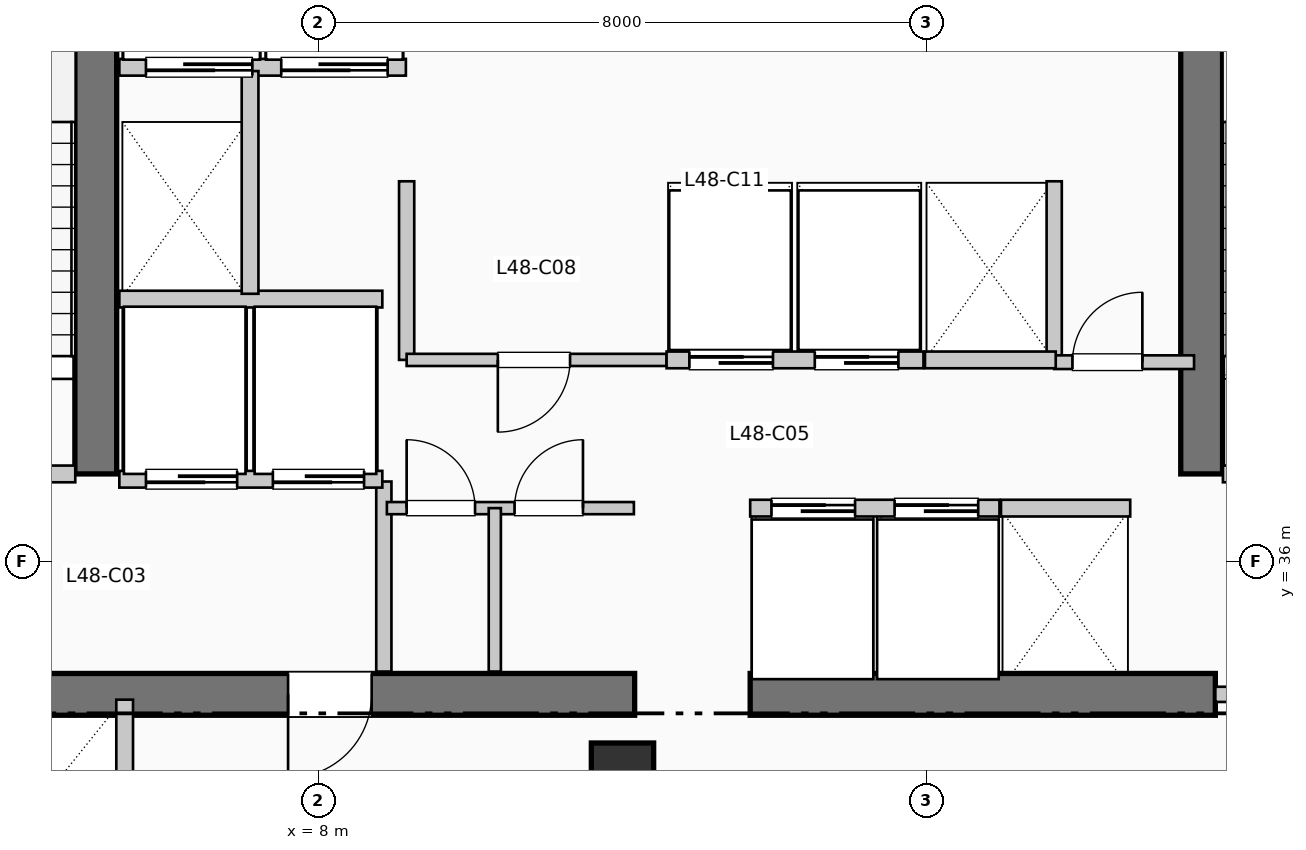
"""IFC4 building model, lengths in metres.
Left out: names, types, materials, properties, quantities, classifications, styles, units other than length and angle.
Written with IfcOpenShell. Run it as: python <this file> out.ifc"""

import sys

from ifc_helpers import new_model, si_unit, direction, frame, frame_2d, origin, origin_2d, place, context, subcontext, project, spatial, rectangle, extrude, element, fill, save


model = new_model("IFC4")
c1 = context("Model", 3, precision=1e-05, world=origin(), true_north=direction((0.0, 1.0)))
c2 = subcontext(c1, "Body", "Model", "MODEL_VIEW")
j1 = project(units=[si_unit("LENGTHUNIT", "METRE"), si_unit("PLANEANGLEUNIT", "RADIAN")], contexts=[c1])
p1 = place(None, origin())
s1 = spatial("IfcSite", under=j1, at=p1, CompositionType="ELEMENT")
p2 = place(p1, origin())
s2 = spatial("IfcBuilding", under=s1, at=p2, CompositionType="ELEMENT")
p3 = place(p2, frame((0.0, 0.0, 199.32)))
s3 = spatial("IfcBuildingStorey", under=s2, at=p3, CompositionType="ELEMENT", Elevation=199.32)
p4 = place(p3, frame((1.45, 34.25, 0.0), z_axis=(0.0, 0.0, 1.0), x_axis=(1.0, 0.0, 0.0)))
e1 = element("IfcWall", 1, at=p4, inside=s3, PredefinedType="SHEAR", context=c2, shape_type="SweptSolid", body=[
    extrude(rectangle(XDim=10.71, YDim=0.55, at=frame_2d((5.355, 0.0))), origin(), (0.0, 0.0, 1.0), 3.96),
])
p5 = place(p4, frame((7.25, 0.0, 0.0), z_axis=(0.0, 0.0, 1.0), x_axis=(-1.0, 0.0, 0.0)))
e2 = element("IfcOpeningElement", 2, at=p5, cuts=e1, PredefinedType="OPENING", context=c2, shape_type="SweptSolid", body=[
    extrude(rectangle(XDim=1.1, YDim=2.15, at=frame_2d((0.55, 1.075))), frame((0.0, 0.285, 0.0), z_axis=(0.0, -1.0, 0.0), x_axis=(1.0, 0.0, 0.0)), (0.0, 0.0, 1.0), 0.57),
])
p6 = place(p3, frame((13.68, 34.25, 0.0), z_axis=(0.0, 0.0, 1.0), x_axis=(1.0, 0.0, 0.0)))
e3 = element("IfcWall", 3, at=p6, inside=s3, PredefinedType="SHEAR", context=c2, shape_type="SweptSolid", body=[
    extrude(rectangle(XDim=6.12, YDim=0.55, at=frame_2d((3.06, 0.0))), origin(), (0.0, 0.0, 1.0), 3.96),
])
for number, where, z_axis, x_axis in (
    (4, (5.07, 37.15, 0.0), (0.0, 0.0, 1.0), (0.0, 1.0, 0.0)),
    (5, (19.62, 37.15, 0.0), (0.0, 0.0, 1.0), (0.0, 1.0, 0.0)),
):
    element("IfcWall", number, at=place(p3, frame(where, z_axis=z_axis, x_axis=x_axis)), inside=s3, PredefinedType="SHEAR", context=c2, shape_type="SweptSolid", body=[
        extrude(rectangle(XDim=7.89, YDim=0.55, at=frame_2d((3.945, 0.0))), origin(), (0.0, 0.0, 1.0), 3.96),
    ])
p7 = place(p3, frame((12.0, 33.2, 0.0), z_axis=(0.0, 0.0, 1.0), x_axis=(1.0, 0.0, 0.0)))
e6 = element("IfcColumn", 6, at=p7, inside=s3, PredefinedType="COLUMN", context=c2, shape_type="SweptSolid", body=[
    extrude(rectangle(XDim=0.82, YDim=0.82, at=origin_2d()), origin(), (0.0, 0.0, 1.0), 3.96),
])
p8 = place(p3, frame((1.65, 37.15, 0.0), z_axis=(0.0, 0.0, 1.0), x_axis=(1.0, 0.0, 0.0)))
e7 = element("IfcWall", 7, at=p8, inside=s3, PredefinedType="PARTITIONING", context=c2, shape_type="SweptSolid", body=[
    extrude(rectangle(XDim=3.15, YDim=0.22, at=frame_2d((1.575, 0.0))), origin(), (0.0, 0.0, 1.0), 3.71),
])
p9 = place(p8, frame((2.05, 0.0, 0.0), z_axis=(0.0, 0.0, 1.0), x_axis=(-1.0, 0.0, 0.0)))
e8 = element("IfcOpeningElement", 8, at=p9, cuts=e7, PredefinedType="OPENING", context=c2, shape_type="SweptSolid", body=[
    extrude(rectangle(XDim=1.05, YDim=2.15, at=frame_2d((0.525, 1.075))), frame((0.0, 0.12, 0.0), z_axis=(0.0, -1.0, 0.0), x_axis=(1.0, 0.0, 0.0)), (0.0, 0.0, 1.0), 0.24),
])
p10 = place(p3, frame((8.86, 34.55, 0.0), z_axis=(0.0, 0.0, 1.0), x_axis=(0.0, 1.0, 0.0)))
e9 = element("IfcWall", 9, at=p10, inside=s3, PredefinedType="PARTITIONING", context=c2, shape_type="SweptSolid", body=[
    extrude(rectangle(XDim=2.5, YDim=0.2, at=frame_2d((1.25, 0.0))), origin(), (0.0, 0.0, 1.0), 3.71),
])
p11 = place(p3, frame((19.9, 37.15, 0.0), z_axis=(0.0, 0.0, 1.0), x_axis=(1.0, 0.0, 0.0)))
e10 = element("IfcWall", 10, at=p11, inside=s3, PredefinedType="PARTITIONING", context=c2, shape_type="SweptSolid", body=[
    extrude(rectangle(XDim=3.15, YDim=0.22, at=frame_2d((1.575, 0.0))), origin(), (0.0, 0.0, 1.0), 3.71),
])
p12 = place(p11, frame((2.05, 0.0, 0.0), z_axis=(0.0, 0.0, 1.0), x_axis=(-1.0, 0.0, 0.0)))
e11 = element("IfcOpeningElement", 11, at=p12, cuts=e10, PredefinedType="OPENING", context=c2, shape_type="SweptSolid", body=[
    extrude(rectangle(XDim=1.05, YDim=2.15, at=frame_2d((0.525, 1.075))), frame((0.0, 0.12, 0.0), z_axis=(0.0, -1.0, 0.0), x_axis=(1.0, 0.0, 0.0)), (0.0, 0.0, 1.0), 0.24),
])
p13 = place(p3, frame((19.8, 34.25, 0.0), z_axis=(0.0, 0.0, 1.0), x_axis=(1.0, 0.0, 0.0)))
e12 = element("IfcWall", 12, at=p13, inside=s3, PredefinedType="PARTITIONING", context=c2, shape_type="SweptSolid", body=[
    extrude(rectangle(XDim=3.25, YDim=0.2, at=frame_2d((1.625, 0.0))), origin(), (0.0, 0.0, 1.0), 3.71),
])
p14 = place(p13, frame((2.15, 0.0, 0.0), z_axis=(0.0, 0.0, 1.0), x_axis=(-1.0, 0.0, 0.0)))
e13 = element("IfcOpeningElement", 13, at=p14, cuts=e12, PredefinedType="OPENING", context=c2, shape_type="SweptSolid", body=[
    extrude(rectangle(XDim=1.1, YDim=2.15, at=frame_2d((0.55, 1.075))), frame((0.0, 0.11, 0.0), z_axis=(0.0, -1.0, 0.0), x_axis=(1.0, 0.0, 0.0)), (0.0, 0.0, 1.0), 0.22),
])
p15 = place(p3, frame((5.38, 37.08, 0.0), z_axis=(0.0, 0.0, 1.0), x_axis=(1.0, 0.0, 0.0)))
e14 = element("IfcWall", 14, at=p15, inside=s3, PredefinedType="PARTITIONING", context=c2, shape_type="SweptSolid", body=[
    extrude(rectangle(XDim=3.46, YDim=0.22, at=frame_2d((1.73, 0.0))), origin(), (0.0, 0.0, 1.0), 3.71),
])
p16 = place(p15, frame((1.55, 0.0, 0.0), z_axis=(0.0, 0.0, 1.0), x_axis=(-1.0, 0.0, 0.0)))
e15 = element("IfcOpeningElement", 15, at=p16, cuts=e14, PredefinedType="OPENING", context=c2, shape_type="SweptSolid", body=[
    extrude(rectangle(XDim=1.2, YDim=2.2, at=frame_2d((0.6, 1.1))), frame((0.0, 0.12, 0.0), z_axis=(0.0, -1.0, 0.0), x_axis=(1.0, 0.0, 0.0)), (0.0, 0.0, 1.0), 0.24),
])
p17 = place(p15, frame((3.22, 0.0, 0.0), z_axis=(0.0, 0.0, 1.0), x_axis=(-1.0, 0.0, 0.0)))
e16 = element("IfcOpeningElement", 16, at=p17, cuts=e14, PredefinedType="OPENING", context=c2, shape_type="SweptSolid", body=[
    extrude(rectangle(XDim=1.2, YDim=2.2, at=frame_2d((0.6, 1.1))), frame((0.0, 0.12, 0.0), z_axis=(0.0, -1.0, 0.0), x_axis=(1.0, 0.0, 0.0)), (0.0, 0.0, 1.0), 0.24),
])
p18 = place(p3, frame((5.38, 39.45, 0.0), z_axis=(0.0, 0.0, 1.0), x_axis=(1.0, 0.0, 0.0)))
e17 = element("IfcWall", 17, at=p18, inside=s3, PredefinedType="PARTITIONING", context=c2, shape_type="SweptSolid", body=[
    extrude(rectangle(XDim=3.46, YDim=0.22, at=frame_2d((1.73, 0.0))), origin(), (0.0, 0.0, 1.0), 3.71),
])
p19 = place(p3, frame((5.38, 42.5, 0.0), z_axis=(0.0, 0.0, 1.0), x_axis=(1.0, 0.0, 0.0)))
e18 = element("IfcWall", 18, at=p19, inside=s3, PredefinedType="PARTITIONING", context=c2, shape_type="SweptSolid", body=[
    extrude(rectangle(XDim=3.77, YDim=0.22, at=frame_2d((1.885, 0.0))), origin(), (0.0, 0.0, 1.0), 3.71),
])
p20 = place(p19, frame((1.75, 0.0, 0.0), z_axis=(0.0, 0.0, 1.0), x_axis=(-1.0, 0.0, 0.0)))
e19 = element("IfcOpeningElement", 19, at=p20, cuts=e18, PredefinedType="OPENING", context=c2, shape_type="SweptSolid", body=[
    extrude(rectangle(XDim=1.4, YDim=2.2, at=frame_2d((0.7, 1.1))), frame((0.0, 0.12, 0.0), z_axis=(0.0, -1.0, 0.0), x_axis=(1.0, 0.0, 0.0)), (0.0, 0.0, 1.0), 0.24),
])
p21 = place(p19, frame((3.53, 0.0, 0.0), z_axis=(0.0, 0.0, 1.0), x_axis=(-1.0, 0.0, 0.0)))
e20 = element("IfcOpeningElement", 20, at=p21, cuts=e18, PredefinedType="OPENING", context=c2, shape_type="SweptSolid", body=[
    extrude(rectangle(XDim=1.4, YDim=2.2, at=frame_2d((0.7, 1.1))), frame((0.0, 0.12, 0.0), z_axis=(0.0, -1.0, 0.0), x_axis=(1.0, 0.0, 0.0)), (0.0, 0.0, 1.0), 0.24),
])
p22 = place(p3, frame((7.1, 39.52, 0.0), z_axis=(0.0, 0.0, 1.0), x_axis=(0.0, 1.0, 0.0)))
e21 = element("IfcWall", 21, at=p22, inside=s3, PredefinedType="PARTITIONING", context=c2, shape_type="SweptSolid", body=[
    extrude(rectangle(XDim=2.93, YDim=0.22, at=frame_2d((1.465, 0.0))), origin(), (0.0, 0.0, 1.0), 3.71),
])
p23 = place(p3, frame((5.45, 31.8, 0.0), z_axis=(0.0, 0.0, 1.0), x_axis=(0.0, 1.0, 0.0)))
e22 = element("IfcWall", 22, at=p23, inside=s3, PredefinedType="PARTITIONING", context=c2, shape_type="SweptSolid", body=[
    extrude(rectangle(XDim=2.38, YDim=0.22, at=frame_2d((1.19, 0.0))), origin(), (0.0, 0.0, 1.0), 3.71),
])
for number, where, z_axis, x_axis in (
    (23, (9.16, 38.65, 0.0), (0.0, 0.0, 1.0), (0.0, 1.0, 0.0)),
    (24, (17.68, 38.65, 0.0), (0.0, 0.0, 1.0), (0.0, 1.0, 0.0)),
):
    element("IfcWall", number, at=place(p3, frame(where, z_axis=z_axis, x_axis=x_axis)), inside=s3, PredefinedType="PARTITIONING", context=c2, shape_type="SweptSolid", body=[
        extrude(rectangle(XDim=2.35, YDim=0.2, at=frame_2d((1.175, 0.0))), origin(), (0.0, 0.0, 1.0), 3.71),
    ])
p24 = place(p3, frame((17.68, 38.62, 0.0), z_axis=(0.0, 0.0, 1.0), x_axis=(1.0, 0.0, 0.0)))
e25 = element("IfcWall", 25, at=p24, inside=s3, PredefinedType="PARTITIONING", context=c2, shape_type="SweptSolid", body=[
    extrude(rectangle(XDim=1.84, YDim=0.18, at=frame_2d((0.92, 0.0))), origin(), (0.0, 0.0, 1.0), 3.71),
])
p25 = place(p24, frame((0.24, 0.0, 0.0)))
e26 = element("IfcOpeningElement", 26, at=p25, cuts=e25, PredefinedType="OPENING", context=c2, shape_type="SweptSolid", body=[
    extrude(rectangle(XDim=0.92, YDim=2.1, at=frame_2d((0.46, 1.05))), frame((0.0, 0.1, 0.0), z_axis=(0.0, -1.0, 0.0), x_axis=(1.0, 0.0, 0.0)), (0.0, 0.0, 1.0), 0.2),
])
p26 = place(p3, frame((8.9, 36.7, 0.0), z_axis=(0.0, 0.0, 1.0), x_axis=(1.0, 0.0, 0.0)))
e27 = element("IfcWall", 27, at=p26, inside=s3, PredefinedType="PARTITIONING", context=c2, shape_type="SweptSolid", body=[
    extrude(rectangle(XDim=3.25, YDim=0.16, at=frame_2d((1.625, 0.0))), origin(), (0.0, 0.0, 1.0), 3.71),
])
p27 = place(p26, frame((0.26, 0.0, 0.0)))
e28 = element("IfcOpeningElement", 28, at=p27, cuts=e27, PredefinedType="OPENING", context=c2, shape_type="SweptSolid", body=[
    extrude(rectangle(XDim=0.9, YDim=2.15, at=frame_2d((0.45, 1.075))), frame((0.0, 0.09, 0.0), z_axis=(0.0, -1.0, 0.0), x_axis=(1.0, 0.0, 0.0)), (0.0, 0.0, 1.0), 0.18),
])
p28 = place(p26, frame((1.68, 0.0, 0.0)))
e29 = element("IfcOpeningElement", 29, at=p28, cuts=e27, PredefinedType="OPENING", context=c2, shape_type="SweptSolid", body=[
    extrude(rectangle(XDim=0.9, YDim=2.15, at=frame_2d((0.45, 1.075))), frame((0.0, 0.09, 0.0), z_axis=(0.0, -1.0, 0.0), x_axis=(1.0, 0.0, 0.0)), (0.0, 0.0, 1.0), 0.18),
])
p29 = place(p3, frame((10.32, 34.55, 0.0), z_axis=(0.0, 0.0, 1.0), x_axis=(0.0, 1.0, 0.0)))
e30 = element("IfcWall", 30, at=p29, inside=s3, PredefinedType="PARTITIONING", context=c2, shape_type="SweptSolid", body=[
    extrude(rectangle(XDim=2.15, YDim=0.16, at=frame_2d((1.075, 0.0))), origin(), (0.0, 0.0, 1.0), 3.71),
])
p30 = place(p3, frame((9.16, 38.65, 0.0), z_axis=(0.0, 0.0, 1.0), x_axis=(1.0, 0.0, 0.0)))
e31 = element("IfcWall", 31, at=p30, inside=s3, PredefinedType="PARTITIONING", context=c2, shape_type="SweptSolid", body=[
    extrude(rectangle(XDim=3.42, YDim=0.16, at=frame_2d((1.71, 0.0))), origin(), (0.0, 0.0, 1.0), 3.71),
])
p31 = place(p30, frame((2.15, 0.0, 0.0), z_axis=(0.0, 0.0, 1.0), x_axis=(-1.0, 0.0, 0.0)))
e32 = element("IfcOpeningElement", 32, at=p31, cuts=e31, PredefinedType="OPENING", context=c2, shape_type="SweptSolid", body=[
    extrude(rectangle(XDim=0.95, YDim=2.15, at=frame_2d((0.475, 1.075))), frame((0.0, 0.09, 0.0), z_axis=(0.0, -1.0, 0.0), x_axis=(1.0, 0.0, 0.0)), (0.0, 0.0, 1.0), 0.18),
])
p32 = place(p3, frame((13.68, 36.7, 0.0), z_axis=(0.0, 0.0, 1.0), x_axis=(1.0, 0.0, 0.0)))
e33 = element("IfcWall", 33, at=p32, inside=s3, PredefinedType="PARTITIONING", context=c2, shape_type="SweptSolid", body=[
    extrude(rectangle(XDim=3.28, YDim=0.22, at=frame_2d((1.64, 0.0))), origin(), (0.0, 0.0, 1.0), 3.71),
])
p33 = place(p32, frame((0.28, 0.0, 0.0)))
e34 = element("IfcOpeningElement", 34, at=p33, cuts=e33, PredefinedType="OPENING", context=c2, shape_type="SweptSolid", body=[
    extrude(rectangle(XDim=1.1, YDim=2.2, at=frame_2d((0.55, 1.1))), frame((0.0, 0.12, 0.0), z_axis=(0.0, -1.0, 0.0), x_axis=(1.0, 0.0, 0.0)), (0.0, 0.0, 1.0), 0.24),
])
p34 = place(p32, frame((1.9, 0.0, 0.0)))
e35 = element("IfcOpeningElement", 35, at=p34, cuts=e33, PredefinedType="OPENING", context=c2, shape_type="SweptSolid", body=[
    extrude(rectangle(XDim=1.1, YDim=2.2, at=frame_2d((0.55, 1.1))), frame((0.0, 0.12, 0.0), z_axis=(0.0, -1.0, 0.0), x_axis=(1.0, 0.0, 0.0)), (0.0, 0.0, 1.0), 0.24),
])
p35 = place(p3, frame((12.58, 38.65, 0.0), z_axis=(0.0, 0.0, 1.0), x_axis=(1.0, 0.0, 0.0)))
e36 = element("IfcWall", 36, at=p35, inside=s3, PredefinedType="PARTITIONING", context=c2, shape_type="SweptSolid", body=[
    extrude(rectangle(XDim=3.38, YDim=0.22, at=frame_2d((1.69, 0.0))), origin(), (0.0, 0.0, 1.0), 3.71),
])
p36 = place(p35, frame((0.3, 0.0, 0.0)))
e37 = element("IfcOpeningElement", 37, at=p36, cuts=e36, PredefinedType="OPENING", context=c2, shape_type="SweptSolid", body=[
    extrude(rectangle(XDim=1.1, YDim=2.2, at=frame_2d((0.55, 1.1))), frame((0.0, 0.12, 0.0), z_axis=(0.0, -1.0, 0.0), x_axis=(1.0, 0.0, 0.0)), (0.0, 0.0, 1.0), 0.24),
])
p37 = place(p35, frame((1.95, 0.0, 0.0)))
e38 = element("IfcOpeningElement", 38, at=p37, cuts=e36, PredefinedType="OPENING", context=c2, shape_type="SweptSolid", body=[
    extrude(rectangle(XDim=1.1, YDim=2.2, at=frame_2d((0.55, 1.1))), frame((0.0, 0.12, 0.0), z_axis=(0.0, -1.0, 0.0), x_axis=(1.0, 0.0, 0.0)), (0.0, 0.0, 1.0), 0.24),
])
p38 = place(p3, frame((16.98, 36.7, 0.0), z_axis=(0.0, 0.0, 1.0), x_axis=(1.0, 0.0, 0.0)))
e39 = element("IfcWall", 39, at=p38, inside=s3, PredefinedType="PARTITIONING", context=c2, shape_type="SweptSolid", body=[
    extrude(rectangle(XDim=1.7, YDim=0.22, at=frame_2d((0.85, 0.0))), origin(), (0.0, 0.0, 1.0), 3.71),
])
p39 = place(p3, frame((15.98, 38.65, 0.0), z_axis=(0.0, 0.0, 1.0), x_axis=(1.0, 0.0, 0.0)))
e40 = element("IfcWall", 40, at=p39, inside=s3, PredefinedType="PARTITIONING", context=c2, shape_type="SweptSolid", body=[
    extrude(rectangle(XDim=1.72, YDim=0.22, at=frame_2d((0.86, 0.0))), origin(), (0.0, 0.0, 1.0), 3.71),
])
p40 = place(p5, origin())
e41 = element("IfcDoor", 41, at=p40, inside=s3, OperationType="SINGLE_SWING_LEFT", PredefinedType="DOOR", context=c2, shape_type="SweptSolid", body=[
    extrude(rectangle(XDim=1.1, YDim=2.15, at=frame_2d((0.55, 1.075))), frame((0.0, 0.025, 0.0), z_axis=(0.0, -1.0, 0.0), x_axis=(1.0, 0.0, 0.0)), (0.0, 0.0, 1.0), 0.05),
])
fill(e2, e41)
p41 = place(p16, origin())
e42 = element("IfcDoor", 42, at=p41, inside=s3, OperationType="SLIDING_TO_RIGHT", PredefinedType="DOOR", context=c2, shape_type="SweptSolid", body=[
    extrude(rectangle(XDim=1.2, YDim=2.2, at=frame_2d((0.6, 1.1))), frame((0.0, 0.025, 0.0), z_axis=(0.0, -1.0, 0.0), x_axis=(1.0, 0.0, 0.0)), (0.0, 0.0, 1.0), 0.05),
])
fill(e15, e42)
p42 = place(p17, origin())
e43 = element("IfcDoor", 43, at=p42, inside=s3, OperationType="SLIDING_TO_RIGHT", PredefinedType="DOOR", context=c2, shape_type="SweptSolid", body=[
    extrude(rectangle(XDim=1.2, YDim=2.2, at=frame_2d((0.6, 1.1))), frame((0.0, 0.025, 0.0), z_axis=(0.0, -1.0, 0.0), x_axis=(1.0, 0.0, 0.0)), (0.0, 0.0, 1.0), 0.05),
])
fill(e16, e43)
p43 = place(p20, origin())
e44 = element("IfcDoor", 44, at=p43, inside=s3, OperationType="SLIDING_TO_LEFT", PredefinedType="DOOR", context=c2, shape_type="SweptSolid", body=[
    extrude(rectangle(XDim=1.4, YDim=2.2, at=frame_2d((0.7, 1.1))), frame((0.0, 0.025, 0.0), z_axis=(0.0, -1.0, 0.0), x_axis=(1.0, 0.0, 0.0)), (0.0, 0.0, 1.0), 0.05),
])
fill(e19, e44)
p44 = place(p21, origin())
e45 = element("IfcDoor", 45, at=p44, inside=s3, OperationType="SLIDING_TO_LEFT", PredefinedType="DOOR", context=c2, shape_type="SweptSolid", body=[
    extrude(rectangle(XDim=1.4, YDim=2.2, at=frame_2d((0.7, 1.1))), frame((0.0, 0.025, 0.0), z_axis=(0.0, -1.0, 0.0), x_axis=(1.0, 0.0, 0.0)), (0.0, 0.0, 1.0), 0.05),
])
fill(e20, e45)
p45 = place(p25, origin())
e46 = element("IfcDoor", 46, at=p45, inside=s3, OperationType="SINGLE_SWING_RIGHT", PredefinedType="DOOR", context=c2, shape_type="SweptSolid", body=[
    extrude(rectangle(XDim=0.92, YDim=2.1, at=frame_2d((0.46, 1.05))), frame((0.0, 0.025, 0.0), z_axis=(0.0, -1.0, 0.0), x_axis=(1.0, 0.0, 0.0)), (0.0, 0.0, 1.0), 0.05),
])
fill(e26, e46)
p46 = place(p27, origin())
e47 = element("IfcDoor", 47, at=p46, inside=s3, OperationType="SINGLE_SWING_LEFT", PredefinedType="DOOR", context=c2, shape_type="SweptSolid", body=[
    extrude(rectangle(XDim=0.9, YDim=2.15, at=frame_2d((0.45, 1.075))), frame((0.0, 0.025, 0.0), z_axis=(0.0, -1.0, 0.0), x_axis=(1.0, 0.0, 0.0)), (0.0, 0.0, 1.0), 0.05),
])
fill(e28, e47)
p47 = place(p28, origin())
e48 = element("IfcDoor", 48, at=p47, inside=s3, OperationType="SINGLE_SWING_RIGHT", PredefinedType="DOOR", context=c2, shape_type="SweptSolid", body=[
    extrude(rectangle(XDim=0.9, YDim=2.15, at=frame_2d((0.45, 1.075))), frame((0.0, 0.025, 0.0), z_axis=(0.0, -1.0, 0.0), x_axis=(1.0, 0.0, 0.0)), (0.0, 0.0, 1.0), 0.05),
])
fill(e29, e48)
p48 = place(p31, origin())
e49 = element("IfcDoor", 49, at=p48, inside=s3, OperationType="SINGLE_SWING_LEFT", PredefinedType="DOOR", context=c2, shape_type="SweptSolid", body=[
    extrude(rectangle(XDim=0.95, YDim=2.15, at=frame_2d((0.475, 1.075))), frame((0.0, 0.025, 0.0), z_axis=(0.0, -1.0, 0.0), x_axis=(1.0, 0.0, 0.0)), (0.0, 0.0, 1.0), 0.05),
])
fill(e32, e49)
p49 = place(p33, origin())
e50 = element("IfcDoor", 50, at=p49, inside=s3, OperationType="SLIDING_TO_RIGHT", PredefinedType="DOOR", context=c2, shape_type="SweptSolid", body=[
    extrude(rectangle(XDim=1.1, YDim=2.2, at=frame_2d((0.55, 1.1))), frame((0.0, 0.025, 0.0), z_axis=(0.0, -1.0, 0.0), x_axis=(1.0, 0.0, 0.0)), (0.0, 0.0, 1.0), 0.05),
])
fill(e34, e50)
p50 = place(p34, origin())
e51 = element("IfcDoor", 51, at=p50, inside=s3, OperationType="SLIDING_TO_RIGHT", PredefinedType="DOOR", context=c2, shape_type="SweptSolid", body=[
    extrude(rectangle(XDim=1.1, YDim=2.2, at=frame_2d((0.55, 1.1))), frame((0.0, 0.025, 0.0), z_axis=(0.0, -1.0, 0.0), x_axis=(1.0, 0.0, 0.0)), (0.0, 0.0, 1.0), 0.05),
])
fill(e35, e51)
p51 = place(p36, origin())
e52 = element("IfcDoor", 52, at=p51, inside=s3, OperationType="SLIDING_TO_RIGHT", PredefinedType="DOOR", context=c2, shape_type="SweptSolid", body=[
    extrude(rectangle(XDim=1.1, YDim=2.2, at=frame_2d((0.55, 1.1))), frame((0.0, 0.025, 0.0), z_axis=(0.0, -1.0, 0.0), x_axis=(1.0, 0.0, 0.0)), (0.0, 0.0, 1.0), 0.05),
])
fill(e37, e52)
p52 = place(p37, origin())
e53 = element("IfcDoor", 53, at=p52, inside=s3, OperationType="SLIDING_TO_RIGHT", PredefinedType="DOOR", context=c2, shape_type="SweptSolid", body=[
    extrude(rectangle(XDim=1.1, YDim=2.2, at=frame_2d((0.55, 1.1))), frame((0.0, 0.025, 0.0), z_axis=(0.0, -1.0, 0.0), x_axis=(1.0, 0.0, 0.0)), (0.0, 0.0, 1.0), 0.05),
])
fill(e38, e53)
save(model, sys.argv[1])
